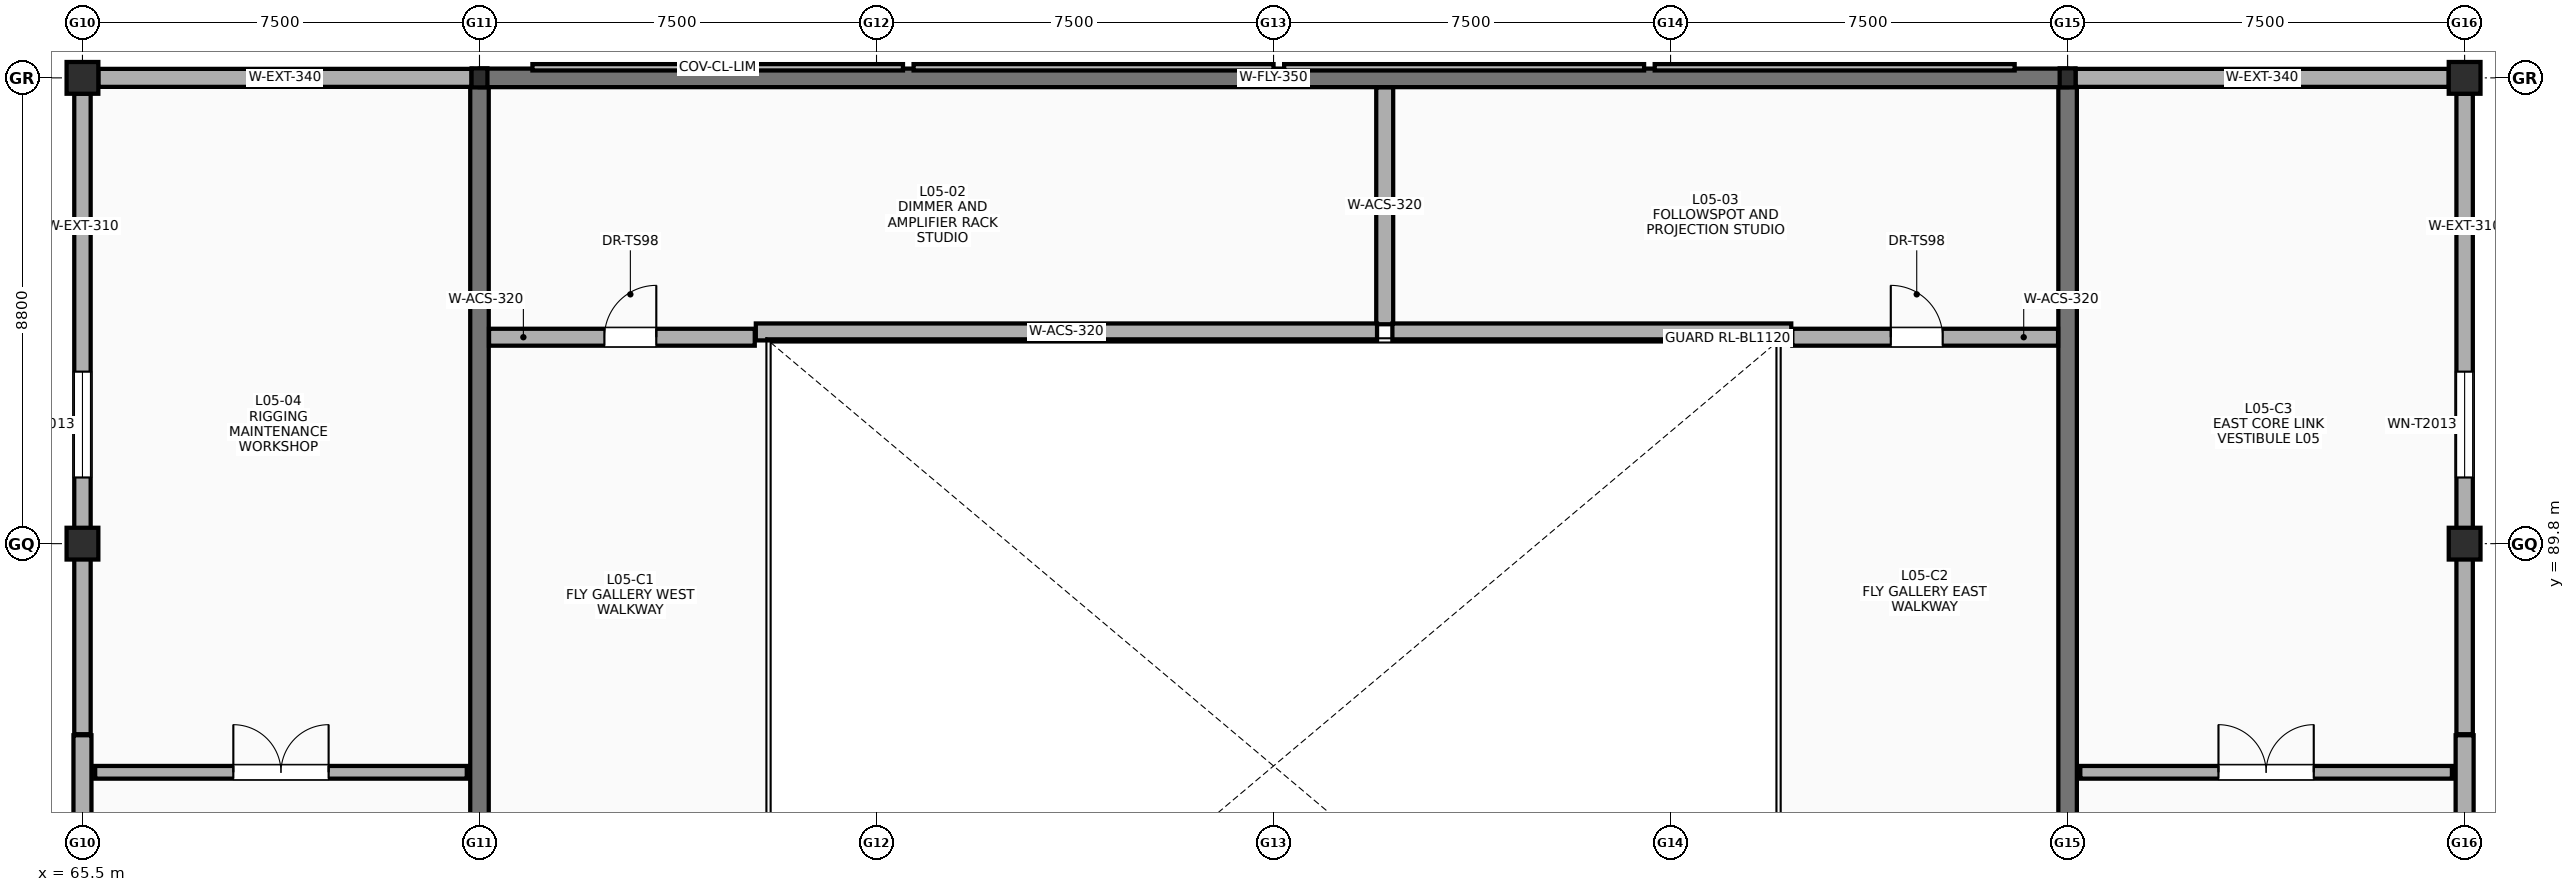
"""IFC4 building model, lengths in metres.
Left out: names, types, materials, properties, quantities, classifications, styles, units other than length and angle.
Written with IfcOpenShell. Run it as: python <this file> out.ifc"""

import sys

from ifc_helpers import new_model, si_unit, direction, frame, frame_2d, origin, origin_2d, place, context, subcontext, project, spatial, rectangle, i_section, extrude, element, fill, save


model = new_model("IFC4")
c1 = context("Model", 3, precision=1e-05, world=origin(), true_north=direction((0.0, 1.0)))
c2 = subcontext(c1, "Body", "Model", "MODEL_VIEW")
j1 = project(units=[si_unit("LENGTHUNIT", "METRE"), si_unit("PLANEANGLEUNIT", "RADIAN")], contexts=[c1])
p1 = place(None, origin())
s1 = spatial("IfcSite", under=j1, at=p1, CompositionType="ELEMENT")
p2 = place(p1, origin())
s2 = spatial("IfcBuilding", under=s1, at=p2, CompositionType="ELEMENT")
p3 = place(p2, frame((0.0, 0.0, 23.4)))
s3 = spatial("IfcBuildingStorey", under=s2, at=p3, CompositionType="ELEMENT", Elevation=23.4)
for number, where, z_axis, x_axis in (
    (1, (65.5, 89.8, 0.0), (0.0, 0.0, 1.0), (1.0, 0.0, 0.0)),
    (2, (65.5, 98.6, 0.0), (0.0, 0.0, 1.0), (1.0, 0.0, 0.0)),
):
    element("IfcColumn", number, at=place(p3, frame(where, z_axis=z_axis, x_axis=x_axis)), inside=s3, PredefinedType="COLUMN", context=c2, shape_type="SweptSolid", body=[
        extrude(rectangle(XDim=0.6, YDim=0.6, at=origin_2d()), origin(), (0.0, 0.0, 1.0), 4.8),
    ])
for number, where, z_axis, x_axis in (
    (3, (73.0, 98.6, 0.0), (0.0, 0.0, 1.0), (1.0, 0.0, 0.0)),
    (4, (103.0, 98.6, 0.0), (0.0, 0.0, 1.0), (1.0, 0.0, 0.0)),
):
    element("IfcColumn", number, at=place(p3, frame(where, z_axis=z_axis, x_axis=x_axis)), inside=s3, PredefinedType="COLUMN", context=c2, shape_type="SweptSolid", body=[
        extrude(i_section(OverallWidth=0.3, OverallDepth=0.36, WebThickness=0.012, FlangeThickness=0.022, FilletRadius=0.027, at=origin_2d()), origin(), (0.0, 0.0, 1.0), 4.8),
    ])
for number, where, z_axis, x_axis in (
    (5, (110.5, 89.8, 0.0), (0.0, 0.0, 1.0), (1.0, 0.0, 0.0)),
    (6, (110.5, 98.6, 0.0), (0.0, 0.0, 1.0), (1.0, 0.0, 0.0)),
):
    element("IfcColumn", number, at=place(p3, frame(where, z_axis=z_axis, x_axis=x_axis)), inside=s3, PredefinedType="COLUMN", context=c2, shape_type="SweptSolid", body=[
        extrude(rectangle(XDim=0.6, YDim=0.6, at=origin_2d()), origin(), (0.0, 0.0, 1.0), 4.8),
    ])
p4 = place(p3, frame((73.0, 72.77, 0.0), z_axis=(0.0, 0.0, 1.0), x_axis=(0.0, 1.0, 0.0)))
e7 = element("IfcWall", 7, at=p4, inside=s3, PredefinedType="SHEAR", context=c2, shape_type="SweptSolid", body=[
    extrude(rectangle(XDim=25.66, YDim=0.35, at=frame_2d((12.83, 0.0))), origin(), (0.0, 0.0, 1.0), 4.8),
])
p5 = place(p4, frame((11.33, 0.0, 0.0), z_axis=(0.0, 0.0, 1.0), x_axis=(-1.0, 0.0, 0.0)))
e8 = element("IfcOpeningElement", 8, at=p5, cuts=e7, PredefinedType="OPENING", context=c2, shape_type="SweptSolid", body=[
    extrude(rectangle(XDim=1.2, YDim=2.15, at=frame_2d((0.6, 1.075))), frame((0.0, 0.185, 0.0), z_axis=(0.0, -1.0, 0.0), x_axis=(1.0, 0.0, 0.0)), (0.0, 0.0, 1.0), 0.37),
])
p6 = place(p3, frame((103.0, 72.77, 0.0), z_axis=(0.0, 0.0, 1.0), x_axis=(0.0, 1.0, 0.0)))
e9 = element("IfcWall", 9, at=p6, inside=s3, PredefinedType="SHEAR", context=c2, shape_type="SweptSolid", body=[
    extrude(rectangle(XDim=25.66, YDim=0.35, at=frame_2d((12.83, 0.0))), origin(), (0.0, 0.0, 1.0), 4.8),
])
p7 = place(p6, frame((10.13, 0.0, 0.0)))
e10 = element("IfcOpeningElement", 10, at=p7, cuts=e9, PredefinedType="OPENING", context=c2, shape_type="SweptSolid", body=[
    extrude(rectangle(XDim=1.2, YDim=2.15, at=frame_2d((0.6, 1.075))), frame((0.0, 0.185, 0.0), z_axis=(0.0, -1.0, 0.0), x_axis=(1.0, 0.0, 0.0)), (0.0, 0.0, 1.0), 0.37),
])
p8 = place(p3, frame((73.005, 98.6, 0.0), z_axis=(0.0, 0.0, 1.0), x_axis=(1.0, 0.0, 0.0)))
e11 = element("IfcWall", 11, at=p8, inside=s3, PredefinedType="SHEAR", context=c2, shape_type="SweptSolid", body=[
    extrude(rectangle(XDim=29.99, YDim=0.35, at=frame_2d((14.995, 0.0))), origin(), (0.0, 0.0, 1.0), 4.8),
])
p9 = place(p3, frame((65.5, 86.2, 0.0), z_axis=(0.0, 0.0, 1.0), x_axis=(0.0, 1.0, 0.0)))
e12 = element("IfcWall", 12, at=p9, inside=s3, PredefinedType="SOLIDWALL", context=c2, shape_type="SweptSolid", body=[
    extrude(rectangle(XDim=12.1, YDim=0.31, at=frame_2d((6.05, 0.0))), origin(), (0.0, 0.0, 1.0), 3.45),
])
p10 = place(p9, frame((4.85, 0.0, 1.25)))
e13 = element("IfcOpeningElement", 13, at=p10, cuts=e12, PredefinedType="OPENING", context=c2, shape_type="SweptSolid", body=[
    extrude(rectangle(XDim=2.0, YDim=1.3, at=frame_2d((1.0, 0.65))), frame((0.0, 0.165, 0.0), z_axis=(0.0, -1.0, 0.0), x_axis=(1.0, 0.0, 0.0)), (0.0, 0.0, 1.0), 0.33),
])
p11 = place(p3, frame((110.5, 86.2, 0.0), z_axis=(0.0, 0.0, 1.0), x_axis=(0.0, 1.0, 0.0)))
e14 = element("IfcWall", 14, at=p11, inside=s3, PredefinedType="SOLIDWALL", context=c2, shape_type="SweptSolid", body=[
    extrude(rectangle(XDim=12.1, YDim=0.31, at=frame_2d((6.05, 0.0))), origin(), (0.0, 0.0, 1.0), 3.45),
])
p12 = place(p11, frame((4.85, 0.0, 1.25)))
e15 = element("IfcOpeningElement", 15, at=p12, cuts=e14, PredefinedType="OPENING", context=c2, shape_type="SweptSolid", body=[
    extrude(rectangle(XDim=2.0, YDim=1.3, at=frame_2d((1.0, 0.65))), frame((0.0, 0.165, 0.0), z_axis=(0.0, -1.0, 0.0), x_axis=(1.0, 0.0, 0.0)), (0.0, 0.0, 1.0), 0.33),
])
for number, where, z_axis, x_axis in (
    (16, (65.8, 98.6, 0.0), (0.0, 0.0, 1.0), (1.0, 0.0, 0.0)),
    (17, (103.15, 98.6, 0.0), (0.0, 0.0, 1.0), (1.0, 0.0, 0.0)),
):
    element("IfcWall", number, at=place(p3, frame(where, z_axis=z_axis, x_axis=x_axis)), inside=s3, PredefinedType="SOLIDWALL", context=c2, shape_type="SweptSolid", body=[
        extrude(rectangle(XDim=7.05, YDim=0.34, at=frame_2d((3.525, 0.0))), origin(), (0.0, 0.0, 1.0), 3.45),
    ])
p13 = place(p3, frame((65.74, 85.48, 0.0), z_axis=(0.0, 0.0, 1.0), x_axis=(1.0, 0.0, 0.0)))
e18 = element("IfcWall", 18, at=p13, inside=s3, PredefinedType="SOLIDWALL", context=c2, shape_type="SweptSolid", body=[
    extrude(rectangle(XDim=7.02, YDim=0.24, at=frame_2d((3.51, 0.0))), origin(), (0.0, 0.0, 1.0), 3.7),
])
p14 = place(p13, frame((2.61, 0.0, 0.0)))
e19 = element("IfcOpeningElement", 19, at=p14, cuts=e18, PredefinedType="OPENING", context=c2, shape_type="SweptSolid", body=[
    extrude(rectangle(XDim=1.8, YDim=2.18, at=frame_2d((0.9, 1.09))), frame((0.0, 0.13, 0.0), z_axis=(0.0, -1.0, 0.0), x_axis=(1.0, 0.0, 0.0)), (0.0, 0.0, 1.0), 0.26),
])
p15 = place(p3, frame((103.24, 85.48, 0.0), z_axis=(0.0, 0.0, 1.0), x_axis=(1.0, 0.0, 0.0)))
e20 = element("IfcWall", 20, at=p15, inside=s3, PredefinedType="SOLIDWALL", context=c2, shape_type="SweptSolid", body=[
    extrude(rectangle(XDim=7.02, YDim=0.24, at=frame_2d((3.51, 0.0))), origin(), (0.0, 0.0, 1.0), 3.7),
])
p16 = place(p15, frame((2.61, 0.0, 0.0)))
e21 = element("IfcOpeningElement", 21, at=p16, cuts=e20, PredefinedType="OPENING", context=c2, shape_type="SweptSolid", body=[
    extrude(rectangle(XDim=1.8, YDim=2.18, at=frame_2d((0.9, 1.09))), frame((0.0, 0.13, 0.0), z_axis=(0.0, -1.0, 0.0), x_axis=(1.0, 0.0, 0.0)), (0.0, 0.0, 1.0), 0.26),
])
p17 = place(p3, frame((90.1, 93.945, 0.0), z_axis=(0.0, 0.0, 1.0), x_axis=(0.0, 1.0, 0.0)))
e22 = element("IfcWall", 22, at=p17, inside=s3, PredefinedType="PARTITIONING", context=c2, shape_type="SweptSolid", body=[
    extrude(rectangle(XDim=4.475, YDim=0.32, at=frame_2d((2.237, 0.0))), origin(), (0.0, 0.0, 1.0), 4.5),
])
p18 = place(p3, frame((73.18, 93.7, 0.0), z_axis=(0.0, 0.0, 1.0), x_axis=(1.0, 0.0, 0.0)))
e23 = element("IfcWall", 23, at=p18, inside=s3, PredefinedType="PARTITIONING", context=c2, shape_type="SweptSolid", body=[
    extrude(rectangle(XDim=5.02, YDim=0.32, at=frame_2d((2.51, 0.0))), origin(), (0.0, 0.0, 1.0), 4.5),
])
p19 = place(p18, frame((2.18, 0.0, 0.0)))
e24 = element("IfcOpeningElement", 24, at=p19, cuts=e23, PredefinedType="OPENING", context=c2, shape_type="SweptSolid", body=[
    extrude(rectangle(XDim=0.98, YDim=2.15, at=frame_2d((0.49, 1.075))), frame((0.0, 0.17, 0.0), z_axis=(0.0, -1.0, 0.0), x_axis=(1.0, 0.0, 0.0)), (0.0, 0.0, 1.0), 0.34),
])
p20 = place(p3, frame((97.8, 93.7, 0.0), z_axis=(0.0, 0.0, 1.0), x_axis=(1.0, 0.0, 0.0)))
e25 = element("IfcWall", 25, at=p20, inside=s3, PredefinedType="PARTITIONING", context=c2, shape_type="SweptSolid", body=[
    extrude(rectangle(XDim=5.02, YDim=0.32, at=frame_2d((2.51, 0.0))), origin(), (0.0, 0.0, 1.0), 4.5),
])
p21 = place(p20, frame((1.86, 0.0, 0.0)))
e26 = element("IfcOpeningElement", 26, at=p21, cuts=e25, PredefinedType="OPENING", context=c2, shape_type="SweptSolid", body=[
    extrude(rectangle(XDim=0.98, YDim=2.15, at=frame_2d((0.49, 1.075))), frame((0.0, 0.17, 0.0), z_axis=(0.0, -1.0, 0.0), x_axis=(1.0, 0.0, 0.0)), (0.0, 0.0, 1.0), 0.34),
])
for number, where, z_axis, x_axis in (
    (27, (110.5, 81.5, 0.0), (0.0, 0.0, 1.0), (0.0, 1.0, 0.0)),
    (28, (65.5, 81.5, 0.0), (0.0, 0.0, 1.0), (0.0, 1.0, 0.0)),
):
    element("IfcWall", number, at=place(p3, frame(where, z_axis=z_axis, x_axis=x_axis)), inside=s3, PredefinedType="SOLIDWALL", context=c2, shape_type="SweptSolid", body=[
        extrude(rectangle(XDim=4.68, YDim=0.34, at=frame_2d((2.34, 0.0))), origin(), (0.0, 0.0, 1.0), 3.45),
    ])
p22 = place(p3, frame((78.22, 93.8, 0.0), z_axis=(0.0, 0.0, 1.0), x_axis=(1.0, 0.0, 0.0)))
e29 = element("IfcWall", 29, at=p22, inside=s3, PredefinedType="PARTITIONING", context=c2, shape_type="SweptSolid", body=[
    extrude(rectangle(XDim=11.735, YDim=0.32, at=frame_2d((5.868, 0.0))), origin(), (0.0, 0.0, 1.0), 4.5),
])
p23 = place(p3, frame((90.245, 93.8, 0.0), z_axis=(0.0, 0.0, 1.0), x_axis=(1.0, 0.0, 0.0)))
e30 = element("IfcWall", 30, at=p23, inside=s3, PredefinedType="PARTITIONING", context=c2, shape_type="SweptSolid", body=[
    extrude(rectangle(XDim=7.535, YDim=0.32, at=frame_2d((3.768, 0.0))), origin(), (0.0, 0.0, 1.0), 4.5),
])
p24 = place(p10, origin())
e31 = element("IfcWindow", 31, at=p24, inside=s3, PartitioningType="SINGLE_PANEL", PredefinedType="WINDOW", context=c2, shape_type="SweptSolid", body=[
    extrude(rectangle(XDim=2.0, YDim=1.3, at=frame_2d((1.0, 0.65))), frame((0.0, 0.03, 0.0), z_axis=(0.0, -1.0, 0.0), x_axis=(1.0, 0.0, 0.0)), (0.0, 0.0, 1.0), 0.06),
])
fill(e13, e31)
p25 = place(p12, origin())
e32 = element("IfcWindow", 32, at=p25, inside=s3, PartitioningType="SINGLE_PANEL", PredefinedType="WINDOW", context=c2, shape_type="SweptSolid", body=[
    extrude(rectangle(XDim=2.0, YDim=1.3, at=frame_2d((1.0, 0.65))), frame((0.0, 0.03, 0.0), z_axis=(0.0, -1.0, 0.0), x_axis=(1.0, 0.0, 0.0)), (0.0, 0.0, 1.0), 0.06),
])
fill(e15, e32)
p26 = place(p14, origin())
e33 = element("IfcDoor", 33, at=p26, inside=s3, OperationType="DOUBLE_DOOR_SINGLE_SWING", PredefinedType="DOOR", context=c2, shape_type="SweptSolid", body=[
    extrude(rectangle(XDim=1.8, YDim=2.18, at=frame_2d((0.9, 1.09))), frame((0.0, 0.025, 0.0), z_axis=(0.0, -1.0, 0.0), x_axis=(1.0, 0.0, 0.0)), (0.0, 0.0, 1.0), 0.05),
])
fill(e19, e33)
p27 = place(p16, origin())
e34 = element("IfcDoor", 34, at=p27, inside=s3, OperationType="DOUBLE_DOOR_SINGLE_SWING", PredefinedType="DOOR", context=c2, shape_type="SweptSolid", body=[
    extrude(rectangle(XDim=1.8, YDim=2.18, at=frame_2d((0.9, 1.09))), frame((0.0, 0.025, 0.0), z_axis=(0.0, -1.0, 0.0), x_axis=(1.0, 0.0, 0.0)), (0.0, 0.0, 1.0), 0.05),
])
fill(e21, e34)
p28 = place(p19, origin())
e35 = element("IfcDoor", 35, at=p28, inside=s3, OperationType="SINGLE_SWING_RIGHT", PredefinedType="DOOR", context=c2, shape_type="SweptSolid", body=[
    extrude(rectangle(XDim=0.98, YDim=2.15, at=frame_2d((0.49, 1.075))), frame((0.0, 0.025, 0.0), z_axis=(0.0, -1.0, 0.0), x_axis=(1.0, 0.0, 0.0)), (0.0, 0.0, 1.0), 0.05),
])
fill(e24, e35)
p29 = place(p21, origin())
e36 = element("IfcDoor", 36, at=p29, inside=s3, OperationType="SINGLE_SWING_LEFT", PredefinedType="DOOR", context=c2, shape_type="SweptSolid", body=[
    extrude(rectangle(XDim=0.98, YDim=2.15, at=frame_2d((0.49, 1.075))), frame((0.0, 0.025, 0.0), z_axis=(0.0, -1.0, 0.0), x_axis=(1.0, 0.0, 0.0)), (0.0, 0.0, 1.0), 0.05),
])
fill(e26, e36)
save(model, sys.argv[1])
